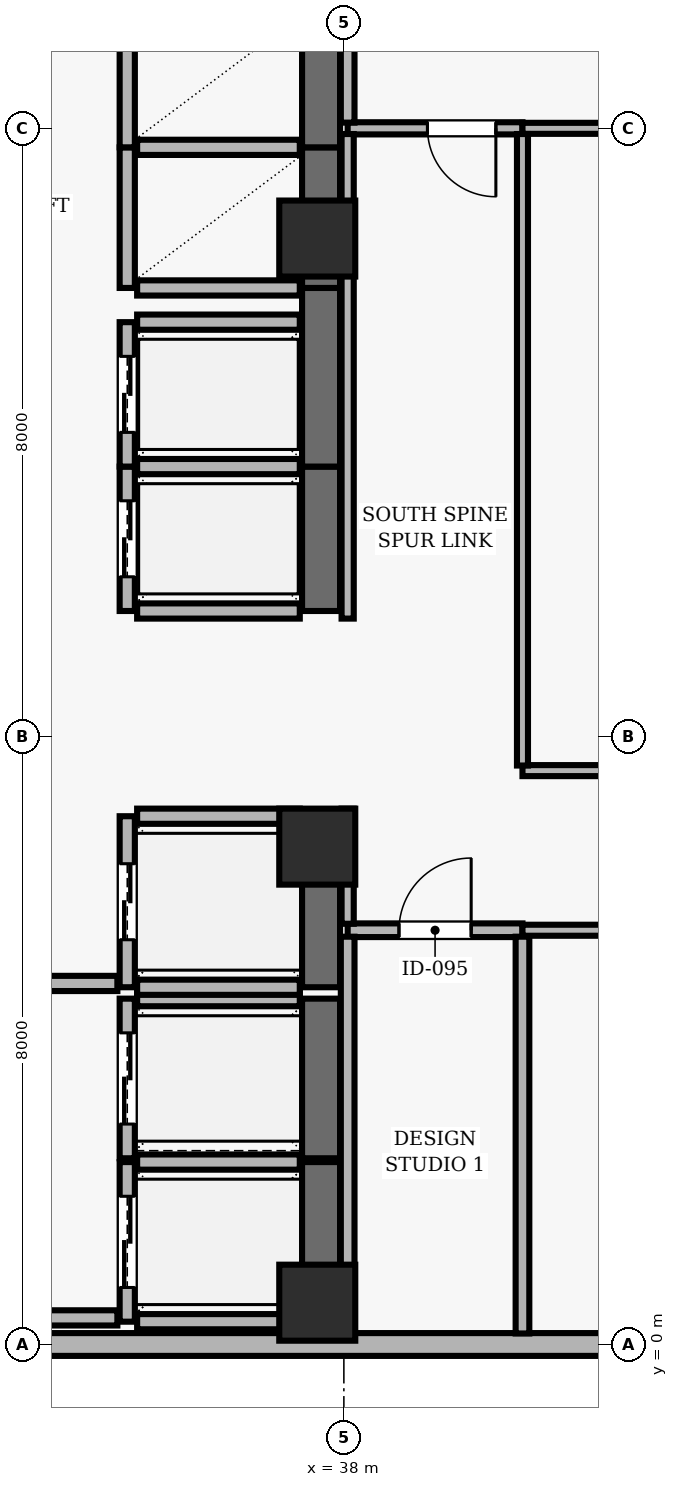
"""IFC4 building model, lengths in metres.
Left out: names, types, materials, properties, quantities, classifications, styles, units other than length and angle.
Written with IfcOpenShell. Run it as: python <this file> out.ifc"""

import sys

from ifc_helpers import new_model, si_unit, direction, frame, frame_2d, origin, origin_2d, place, context, subcontext, project, spatial, rectangle, extrude, element, fill, save


model = new_model("IFC4")
c1 = context("Model", 3, precision=1e-05, world=origin(), true_north=direction((0.0, 1.0)))
c2 = subcontext(c1, "Body", "Model", "MODEL_VIEW")
j1 = project(units=[si_unit("LENGTHUNIT", "METRE"), si_unit("PLANEANGLEUNIT", "RADIAN")], contexts=[c1])
p1 = place(None, origin())
s1 = spatial("IfcSite", under=j1, at=p1, CompositionType="ELEMENT")
p2 = place(p1, origin())
s2 = spatial("IfcBuilding", under=s1, at=p2, CompositionType="ELEMENT")
p3 = place(p2, frame((0.0, 0.0, 191.4)))
s3 = spatial("IfcBuildingStorey", under=s2, at=p3, CompositionType="ELEMENT", Elevation=191.4)
for number, where, z_axis, x_axis in (
    (1, (37.65, 0.55, 0.0), (0.0, 0.0, 1.0), (1.0, 0.0, 0.0)),
    (2, (37.65, 6.55, 0.0), (0.0, 0.0, 1.0), (1.0, 0.0, 0.0)),
    (3, (37.65, 14.55, 0.0), (0.0, 0.0, 1.0), (1.0, 0.0, 0.0)),
):
    element("IfcColumn", number, at=place(p3, frame(where, z_axis=z_axis, x_axis=x_axis)), inside=s3, PredefinedType="COLUMN", context=c2, shape_type="SweptSolid", body=[
        extrude(rectangle(XDim=1.0, YDim=1.0, at=origin_2d()), origin(), (0.0, 0.0, 1.0), 3.9),
    ])
p4 = place(p3, frame((24.5, 0.0, 0.0), z_axis=(0.0, 0.0, 1.0), x_axis=(1.0, 0.0, 0.0)))
e4 = element("IfcWall", 4, at=p4, inside=s3, PredefinedType="SOLIDWALL", context=c2, shape_type="SweptSolid", body=[
    extrude(rectangle(XDim=38.2, YDim=0.3, at=frame_2d((19.1, 0.0))), origin(), (0.0, 0.0, 1.0), 3.69),
])
p5 = place(p4, frame((1.529, 0.0, 0.9)))
e5 = element("IfcOpeningElement", 5, at=p5, cuts=e4, PredefinedType="OPENING", context=c2, shape_type="SweptSolid", body=[
    extrude(rectangle(XDim=2.4, YDim=2.2, at=frame_2d((1.2, 1.1))), frame((0.0, 0.16, 0.0), z_axis=(0.0, -1.0, 0.0), x_axis=(1.0, 0.0, 0.0)), (0.0, 0.0, 1.0), 0.32),
])
p6 = place(p4, frame((17.9, 0.0, 0.9)))
e6 = element("IfcOpeningElement", 6, at=p6, cuts=e4, PredefinedType="OPENING", context=c2, shape_type="SweptSolid", body=[
    extrude(rectangle(XDim=2.4, YDim=2.2, at=frame_2d((1.2, 1.1))), frame((0.0, 0.16, 0.0), z_axis=(0.0, -1.0, 0.0), x_axis=(1.0, 0.0, 0.0)), (0.0, 0.0, 1.0), 0.32),
])
p7 = place(p4, frame((23.357, 0.0, 0.9)))
e7 = element("IfcOpeningElement", 7, at=p7, cuts=e4, PredefinedType="OPENING", context=c2, shape_type="SweptSolid", body=[
    extrude(rectangle(XDim=2.4, YDim=2.2, at=frame_2d((1.2, 1.1))), frame((0.0, 0.16, 0.0), z_axis=(0.0, -1.0, 0.0), x_axis=(1.0, 0.0, 0.0)), (0.0, 0.0, 1.0), 0.32),
])
p8 = place(p4, frame((28.814, 0.0, 0.9)))
e8 = element("IfcOpeningElement", 8, at=p8, cuts=e4, PredefinedType="OPENING", context=c2, shape_type="SweptSolid", body=[
    extrude(rectangle(XDim=2.4, YDim=2.2, at=frame_2d((1.2, 1.1))), frame((0.0, 0.16, 0.0), z_axis=(0.0, -1.0, 0.0), x_axis=(1.0, 0.0, 0.0)), (0.0, 0.0, 1.0), 0.32),
])
p9 = place(p4, frame((34.271, 0.0, 0.9)))
e9 = element("IfcOpeningElement", 9, at=p9, cuts=e4, PredefinedType="OPENING", context=c2, shape_type="SweptSolid", body=[
    extrude(rectangle(XDim=2.4, YDim=2.2, at=frame_2d((1.2, 1.1))), frame((0.0, 0.16, 0.0), z_axis=(0.0, -1.0, 0.0), x_axis=(1.0, 0.0, 0.0)), (0.0, 0.0, 1.0), 0.32),
])
p10 = place(p3, frame((35.15, 2.4, 0.0), z_axis=(0.0, 0.0, 1.0), x_axis=(0.0, -1.0, 0.0)))
e10 = element("IfcWall", 10, at=p10, inside=s3, PredefinedType="SOLIDWALL", context=c2, shape_type="SweptSolid", body=[
    extrude(rectangle(XDim=2.1, YDim=0.2, at=frame_2d((1.05, 0.0))), origin(), (0.0, 0.0, 1.0), 3.69),
])
p11 = place(p10, frame((0.45, 0.0, 0.0)))
e11 = element("IfcOpeningElement", 11, at=p11, cuts=e10, PredefinedType="OPENING", context=c2, shape_type="SweptSolid", body=[
    extrude(rectangle(XDim=1.2, YDim=2.15, at=frame_2d((0.6, 1.075))), frame((0.0, 0.11, 0.0), z_axis=(0.0, -1.0, 0.0), x_axis=(1.0, 0.0, 0.0)), (0.0, 0.0, 1.0), 0.22),
])
p12 = place(p3, frame((37.7, 0.3, 0.0), z_axis=(0.0, 0.0, 1.0), x_axis=(0.0, 1.0, 0.0)))
e12 = element("IfcWall", 12, at=p12, inside=s3, PredefinedType="SHEAR", context=c2, shape_type="SweptSolid", body=[
    extrude(rectangle(XDim=2.1, YDim=0.5, at=frame_2d((1.05, 0.0))), origin(), (0.0, 0.0, 1.0), 3.69),
])
for number, where, z_axis, x_axis in (
    (13, (35.28, 0.3, 0.0), (0.0, 0.0, 1.0), (1.0, 0.0, 0.0)),
    (14, (37.42, 2.4, 0.0), (0.0, 0.0, 1.0), (-1.0, 0.0, 0.0)),
):
    element("IfcWall", number, at=place(p3, frame(where, z_axis=z_axis, x_axis=x_axis)), inside=s3, PredefinedType="SOLIDWALL", context=c2, shape_type="SweptSolid", body=[
        extrude(rectangle(XDim=2.14, YDim=0.2, at=frame_2d((1.07, 0.0))), origin(), (0.0, 0.0, 1.0), 3.69),
    ])
p13 = place(p3, frame((35.15, 4.55, 0.0), z_axis=(0.0, 0.0, 1.0), x_axis=(0.0, -1.0, 0.0)))
e15 = element("IfcWall", 15, at=p13, inside=s3, PredefinedType="SOLIDWALL", context=c2, shape_type="SweptSolid", body=[
    extrude(rectangle(XDim=2.1, YDim=0.2, at=frame_2d((1.05, 0.0))), origin(), (0.0, 0.0, 1.0), 3.69),
])
p14 = place(p13, frame((0.45, 0.0, 0.0)))
e16 = element("IfcOpeningElement", 16, at=p14, cuts=e15, PredefinedType="OPENING", context=c2, shape_type="SweptSolid", body=[
    extrude(rectangle(XDim=1.2, YDim=2.15, at=frame_2d((0.6, 1.075))), frame((0.0, 0.11, 0.0), z_axis=(0.0, -1.0, 0.0), x_axis=(1.0, 0.0, 0.0)), (0.0, 0.0, 1.0), 0.22),
])
p15 = place(p3, frame((37.7, 2.45, 0.0), z_axis=(0.0, 0.0, 1.0), x_axis=(0.0, 1.0, 0.0)))
e17 = element("IfcWall", 17, at=p15, inside=s3, PredefinedType="SHEAR", context=c2, shape_type="SweptSolid", body=[
    extrude(rectangle(XDim=2.1, YDim=0.5, at=frame_2d((1.05, 0.0))), origin(), (0.0, 0.0, 1.0), 3.69),
])
p16 = place(p3, frame((37.42, 4.55, 0.0), z_axis=(0.0, 0.0, 1.0), x_axis=(-1.0, 0.0, 0.0)))
e18 = element("IfcWall", 18, at=p16, inside=s3, PredefinedType="SOLIDWALL", context=c2, shape_type="SweptSolid", body=[
    extrude(rectangle(XDim=2.14, YDim=0.2, at=frame_2d((1.07, 0.0))), origin(), (0.0, 0.0, 1.0), 3.69),
])
p17 = place(p3, frame((35.15, 6.95, 0.0), z_axis=(0.0, 0.0, 1.0), x_axis=(0.0, -1.0, 0.0)))
e19 = element("IfcWall", 19, at=p17, inside=s3, PredefinedType="SOLIDWALL", context=c2, shape_type="SweptSolid", body=[
    extrude(rectangle(XDim=2.25, YDim=0.2, at=frame_2d((1.125, 0.0))), origin(), (0.0, 0.0, 1.0), 3.69),
])
p18 = place(p17, frame((0.625, 0.0, 0.0)))
e20 = element("IfcOpeningElement", 20, at=p18, cuts=e19, PredefinedType="OPENING", context=c2, shape_type="SweptSolid", body=[
    extrude(rectangle(XDim=1.0, YDim=2.1, at=frame_2d((0.5, 1.05))), frame((0.0, 0.11, 0.0), z_axis=(0.0, -1.0, 0.0), x_axis=(1.0, 0.0, 0.0)), (0.0, 0.0, 1.0), 0.22),
])
p19 = place(p3, frame((37.7, 4.7, 0.0), z_axis=(0.0, 0.0, 1.0), x_axis=(0.0, 1.0, 0.0)))
e21 = element("IfcWall", 21, at=p19, inside=s3, PredefinedType="SHEAR", context=c2, shape_type="SweptSolid", body=[
    extrude(rectangle(XDim=2.25, YDim=0.5, at=frame_2d((1.125, 0.0))), origin(), (0.0, 0.0, 1.0), 3.69),
])
for number, where, z_axis, x_axis in (
    (22, (35.28, 4.7, 0.0), (0.0, 0.0, 1.0), (1.0, 0.0, 0.0)),
    (23, (37.42, 6.95, 0.0), (0.0, 0.0, 1.0), (-1.0, 0.0, 0.0)),
):
    element("IfcWall", number, at=place(p3, frame(where, z_axis=z_axis, x_axis=x_axis)), inside=s3, PredefinedType="SOLIDWALL", context=c2, shape_type="SweptSolid", body=[
        extrude(rectangle(XDim=2.14, YDim=0.2, at=frame_2d((1.07, 0.0))), origin(), (0.0, 0.0, 1.0), 3.69),
    ])
p20 = place(p3, frame((35.15, 11.55, 0.0), z_axis=(0.0, 0.0, 1.0), x_axis=(0.0, -1.0, 0.0)))
e24 = element("IfcWall", 24, at=p20, inside=s3, PredefinedType="SOLIDWALL", context=c2, shape_type="SweptSolid", body=[
    extrude(rectangle(XDim=1.9, YDim=0.2, at=frame_2d((0.95, 0.0))), origin(), (0.0, 0.0, 1.0), 3.69),
])
p21 = place(p20, frame((0.45, 0.0, 0.0)))
e25 = element("IfcOpeningElement", 25, at=p21, cuts=e24, PredefinedType="OPENING", context=c2, shape_type="SweptSolid", body=[
    extrude(rectangle(XDim=1.0, YDim=2.1, at=frame_2d((0.5, 1.05))), frame((0.0, 0.11, 0.0), z_axis=(0.0, -1.0, 0.0), x_axis=(1.0, 0.0, 0.0)), (0.0, 0.0, 1.0), 0.22),
])
p22 = place(p3, frame((37.7, 9.65, 0.0), z_axis=(0.0, 0.0, 1.0), x_axis=(0.0, 1.0, 0.0)))
e26 = element("IfcWall", 26, at=p22, inside=s3, PredefinedType="SHEAR", context=c2, shape_type="SweptSolid", body=[
    extrude(rectangle(XDim=1.9, YDim=0.5, at=frame_2d((0.95, 0.0))), origin(), (0.0, 0.0, 1.0), 3.69),
])
for number, where, z_axis, x_axis in (
    (27, (35.28, 9.65, 0.0), (0.0, 0.0, 1.0), (1.0, 0.0, 0.0)),
    (28, (37.42, 11.55, 0.0), (0.0, 0.0, 1.0), (-1.0, 0.0, 0.0)),
):
    element("IfcWall", number, at=place(p3, frame(where, z_axis=z_axis, x_axis=x_axis)), inside=s3, PredefinedType="SOLIDWALL", context=c2, shape_type="SweptSolid", body=[
        extrude(rectangle(XDim=2.14, YDim=0.2, at=frame_2d((1.07, 0.0))), origin(), (0.0, 0.0, 1.0), 3.69),
    ])
p23 = place(p3, frame((35.15, 13.45, 0.0), z_axis=(0.0, 0.0, 1.0), x_axis=(0.0, -1.0, 0.0)))
e29 = element("IfcWall", 29, at=p23, inside=s3, PredefinedType="SOLIDWALL", context=c2, shape_type="SweptSolid", body=[
    extrude(rectangle(XDim=1.9, YDim=0.2, at=frame_2d((0.95, 0.0))), origin(), (0.0, 0.0, 1.0), 3.69),
])
p24 = place(p23, frame((0.45, 0.0, 0.0)))
e30 = element("IfcOpeningElement", 30, at=p24, cuts=e29, PredefinedType="OPENING", context=c2, shape_type="SweptSolid", body=[
    extrude(rectangle(XDim=1.0, YDim=2.1, at=frame_2d((0.5, 1.05))), frame((0.0, 0.11, 0.0), z_axis=(0.0, -1.0, 0.0), x_axis=(1.0, 0.0, 0.0)), (0.0, 0.0, 1.0), 0.22),
])
p25 = place(p3, frame((37.7, 11.55, 0.0), z_axis=(0.0, 0.0, 1.0), x_axis=(0.0, 1.0, 0.0)))
e31 = element("IfcWall", 31, at=p25, inside=s3, PredefinedType="SHEAR", context=c2, shape_type="SweptSolid", body=[
    extrude(rectangle(XDim=2.35, YDim=0.5, at=frame_2d((1.175, 0.0))), origin(), (0.0, 0.0, 1.0), 3.69),
])
p26 = place(p3, frame((37.42, 13.45, 0.0), z_axis=(0.0, 0.0, 1.0), x_axis=(-1.0, 0.0, 0.0)))
e32 = element("IfcWall", 32, at=p26, inside=s3, PredefinedType="SOLIDWALL", context=c2, shape_type="SweptSolid", body=[
    extrude(rectangle(XDim=2.14, YDim=0.2, at=frame_2d((1.07, 0.0))), origin(), (0.0, 0.0, 1.0), 3.69),
])
p27 = place(p3, frame((35.15, 15.75, 0.0), z_axis=(0.0, 0.0, 1.0), x_axis=(0.0, -1.0, 0.0)))
e33 = element("IfcWall", 33, at=p27, inside=s3, PredefinedType="SOLIDWALL", context=c2, shape_type="SweptSolid", body=[
    extrude(rectangle(XDim=1.85, YDim=0.2, at=frame_2d((0.925, 0.0))), origin(), (0.0, 0.0, 1.0), 3.69),
])
p28 = place(p3, frame((37.7, 13.9, 0.0), z_axis=(0.0, 0.0, 1.0), x_axis=(0.0, 1.0, 0.0)))
e34 = element("IfcWall", 34, at=p28, inside=s3, PredefinedType="SHEAR", context=c2, shape_type="SweptSolid", body=[
    extrude(rectangle(XDim=1.85, YDim=0.5, at=frame_2d((0.925, 0.0))), origin(), (0.0, 0.0, 1.0), 3.69),
])
for number, where, z_axis, x_axis in (
    (35, (35.28, 13.9, 0.0), (0.0, 0.0, 1.0), (1.0, 0.0, 0.0)),
    (36, (37.42, 15.75, 0.0), (0.0, 0.0, 1.0), (-1.0, 0.0, 0.0)),
):
    element("IfcWall", number, at=place(p3, frame(where, z_axis=z_axis, x_axis=x_axis)), inside=s3, PredefinedType="SOLIDWALL", context=c2, shape_type="SweptSolid", body=[
        extrude(rectangle(XDim=2.14, YDim=0.2, at=frame_2d((1.07, 0.0))), origin(), (0.0, 0.0, 1.0), 3.69),
    ])
p29 = place(p3, frame((35.15, 17.6, 0.0), z_axis=(0.0, 0.0, 1.0), x_axis=(0.0, -1.0, 0.0)))
e37 = element("IfcWall", 37, at=p29, inside=s3, PredefinedType="SOLIDWALL", context=c2, shape_type="SweptSolid", body=[
    extrude(rectangle(XDim=1.85, YDim=0.2, at=frame_2d((0.925, 0.0))), origin(), (0.0, 0.0, 1.0), 3.69),
])
p30 = place(p3, frame((37.7, 15.75, 0.0), z_axis=(0.0, 0.0, 1.0), x_axis=(0.0, 1.0, 0.0)))
e38 = element("IfcWall", 38, at=p30, inside=s3, PredefinedType="SHEAR", context=c2, shape_type="SweptSolid", body=[
    extrude(rectangle(XDim=1.85, YDim=0.5, at=frame_2d((0.925, 0.0))), origin(), (0.0, 0.0, 1.0), 3.69),
])
p31 = place(p3, frame((31.65, 0.35, 0.0), z_axis=(0.0, 0.0, 1.0), x_axis=(1.0, 0.0, 0.0)))
e39 = element("IfcWall", 39, at=p31, inside=s3, PredefinedType="SOLIDWALL", context=c2, shape_type="SweptSolid", body=[
    extrude(rectangle(XDim=3.37, YDim=0.2, at=frame_2d((1.685, 0.0))), origin(), (0.0, 0.0, 1.0), 3.69),
])
p32 = place(p3, frame((35.02, 4.75, 0.0), z_axis=(0.0, 0.0, 1.0), x_axis=(-1.0, 0.0, 0.0)))
e40 = element("IfcWall", 40, at=p32, inside=s3, PredefinedType="SOLIDWALL", context=c2, shape_type="SweptSolid", body=[
    extrude(rectangle(XDim=3.11, YDim=0.2, at=frame_2d((1.555, 0.0))), origin(), (0.0, 0.0, 1.0), 3.69),
])
p33 = place(p32, frame((1.03, 0.0, 0.0)))
e41 = element("IfcOpeningElement", 41, at=p33, cuts=e40, PredefinedType="OPENING", context=c2, shape_type="SweptSolid", body=[
    extrude(rectangle(XDim=1.05, YDim=2.15, at=frame_2d((0.525, 1.075))), frame((0.0, 0.11, 0.0), z_axis=(0.0, -1.0, 0.0), x_axis=(1.0, 0.0, 0.0)), (0.0, 0.0, 1.0), 0.22),
])
p34 = place(p3, frame((38.05, 5.45, 0.0), z_axis=(0.0, 0.0, 1.0), x_axis=(1.0, 0.0, 0.0)))
e42 = element("IfcWall", 42, at=p34, inside=s3, PredefinedType="PARTITIONING", context=c2, shape_type="SweptSolid", body=[
    extrude(rectangle(XDim=2.3, YDim=0.18, at=frame_2d((1.15, 0.0))), origin(), (0.0, 0.0, 1.0), 3.343),
])
p35 = place(p34, frame((0.675, 0.0, 0.0)))
e43 = element("IfcOpeningElement", 43, at=p35, cuts=e42, PredefinedType="OPENING", context=c2, shape_type="SweptSolid", body=[
    extrude(rectangle(XDim=0.95, YDim=2.1, at=frame_2d((0.475, 1.05))), frame((0.0, 0.1, 0.0), z_axis=(0.0, -1.0, 0.0), x_axis=(1.0, 0.0, 0.0)), (0.0, 0.0, 1.0), 0.2),
])
p36 = place(p3, frame((40.35, 5.45, 0.0), z_axis=(0.0, 0.0, 1.0), x_axis=(1.0, 0.0, 0.0)))
e44 = element("IfcWall", 44, at=p36, inside=s3, PredefinedType="PARTITIONING", context=c2, shape_type="SweptSolid", body=[
    extrude(rectangle(XDim=11.65, YDim=0.145, at=frame_2d((5.825, 0.0))), origin(), (0.0, 0.0, 1.0), 3.343),
])
p37 = place(p36, frame((5.275, 0.0, 0.0)))
e45 = element("IfcOpeningElement", 45, at=p37, cuts=e44, PredefinedType="OPENING", context=c2, shape_type="SweptSolid", body=[
    extrude(rectangle(XDim=1.1, YDim=2.15, at=frame_2d((0.55, 1.075))), frame((0.0, 0.083, 0.0), z_axis=(0.0, -1.0, 0.0), x_axis=(1.0, 0.0, 0.0)), (0.0, 0.0, 1.0), 0.165),
])
p38 = place(p3, frame((40.35, 16.0, 0.0), z_axis=(0.0, 0.0, 1.0), x_axis=(-1.0, 0.0, 0.0)))
e46 = element("IfcWall", 46, at=p38, inside=s3, PredefinedType="PARTITIONING", context=c2, shape_type="SweptSolid", body=[
    extrude(rectangle(XDim=2.3, YDim=0.16, at=frame_2d((1.15, 0.0))), origin(), (0.0, 0.0, 1.0), 3.69),
])
p39 = place(p38, frame((0.35, 0.0, 0.0)))
e47 = element("IfcOpeningElement", 47, at=p39, cuts=e46, PredefinedType="OPENING", context=c2, shape_type="SweptSolid", body=[
    extrude(rectangle(XDim=0.9, YDim=2.1, at=frame_2d((0.45, 1.05))), frame((0.0, 0.09, 0.0), z_axis=(0.0, -1.0, 0.0), x_axis=(1.0, 0.0, 0.0)), (0.0, 0.0, 1.0), 0.18),
])
p40 = place(p3, frame((40.35, 16.0, 0.0), z_axis=(0.0, 0.0, 1.0), x_axis=(1.0, 0.0, 0.0)))
e48 = element("IfcWall", 48, at=p40, inside=s3, PredefinedType="PARTITIONING", context=c2, shape_type="SweptSolid", body=[
    extrude(rectangle(XDim=8.055, YDim=0.145, at=frame_2d((4.027, 0.0))), origin(), (0.0, 0.0, 1.0), 3.39),
])
p41 = place(p3, frame((52.0, 7.55, 0.0), z_axis=(0.0, 0.0, 1.0), x_axis=(-1.0, 0.0, 0.0)))
e49 = element("IfcWall", 49, at=p41, inside=s3, PredefinedType="PARTITIONING", context=c2, shape_type="SweptSolid", body=[
    extrude(rectangle(XDim=11.65, YDim=0.145, at=frame_2d((5.825, 0.0))), origin(), (0.0, 0.0, 1.0), 3.139),
])
p42 = place(p41, frame((3.175, 0.0, 0.0)))
e50 = element("IfcOpeningElement", 50, at=p42, cuts=e49, PredefinedType="OPENING", context=c2, shape_type="SweptSolid", body=[
    extrude(rectangle(XDim=1.1, YDim=2.15, at=frame_2d((0.55, 1.075))), frame((0.0, 0.083, 0.0), z_axis=(0.0, -1.0, 0.0), x_axis=(1.0, 0.0, 0.0)), (0.0, 0.0, 1.0), 0.165),
])
p43 = place(p3, frame((38.05, 5.365, 0.0), z_axis=(0.0, 0.0, 1.0), x_axis=(0.0, -1.0, 0.0)))
e51 = element("IfcWall", 51, at=p43, inside=s3, PredefinedType="PARTITIONING", context=c2, shape_type="SweptSolid", body=[
    extrude(rectangle(XDim=5.22, YDim=0.18, at=frame_2d((2.61, 0.0))), origin(), (0.0, 0.0, 1.0), 3.139),
])
p44 = place(p3, frame((38.05, 7.05, 0.0), z_axis=(0.0, 0.0, 1.0), x_axis=(0.0, -1.0, 0.0)))
e52 = element("IfcWall", 52, at=p44, inside=s3, PredefinedType="PARTITIONING", context=c2, shape_type="SweptSolid", body=[
    extrude(rectangle(XDim=1.515, YDim=0.16, at=frame_2d((0.758, 0.0))), origin(), (0.0, 0.0, 1.0), 3.139),
])
p45 = place(p3, frame((38.05, 15.925, 0.0), z_axis=(0.0, 0.0, 1.0), x_axis=(0.0, -1.0, 0.0)))
e53 = element("IfcWall", 53, at=p45, inside=s3, PredefinedType="PARTITIONING", context=c2, shape_type="SweptSolid", body=[
    extrude(rectangle(XDim=6.375, YDim=0.16, at=frame_2d((3.188, 0.0))), origin(), (0.0, 0.0, 1.0), 3.139),
])
p46 = place(p3, frame((38.05, 23.843, 0.0), z_axis=(0.0, 0.0, 1.0), x_axis=(0.0, -1.0, 0.0)))
e54 = element("IfcWall", 54, at=p46, inside=s3, PredefinedType="PARTITIONING", context=c2, shape_type="SweptSolid", body=[
    extrude(rectangle(XDim=7.768, YDim=0.18, at=frame_2d((3.884, 0.0))), origin(), (0.0, 0.0, 1.0), 3.139),
])
p47 = place(p3, frame((40.35, 0.145, 0.0), z_axis=(0.0, 0.0, 1.0), x_axis=(0.0, 1.0, 0.0)))
e55 = element("IfcWall", 55, at=p47, inside=s3, PredefinedType="PARTITIONING", context=c2, shape_type="SweptSolid", body=[
    extrude(rectangle(XDim=5.22, YDim=0.18, at=frame_2d((2.61, 0.0))), origin(), (0.0, 0.0, 1.0), 3.69),
])
p48 = place(p3, frame((40.35, 7.617, 0.0), z_axis=(0.0, 0.0, 1.0), x_axis=(0.0, 1.0, 0.0)))
e56 = element("IfcWall", 56, at=p48, inside=s3, PredefinedType="PARTITIONING", context=c2, shape_type="SweptSolid", body=[
    extrude(rectangle(XDim=8.308, YDim=0.145, at=frame_2d((4.154, 0.0))), origin(), (0.0, 0.0, 1.0), 3.343),
])
p49 = place(p11, origin())
e57 = element("IfcDoor", 57, at=p49, inside=s3, OperationType="DOUBLE_DOOR_SLIDING", PredefinedType="DOOR", context=c2, shape_type="SweptSolid", body=[
    extrude(rectangle(XDim=1.2, YDim=2.15, at=frame_2d((0.6, 1.075))), frame((0.0, 0.025, 0.0), z_axis=(0.0, -1.0, 0.0), x_axis=(1.0, 0.0, 0.0)), (0.0, 0.0, 1.0), 0.05),
])
fill(e11, e57)
p50 = place(p14, origin())
e58 = element("IfcDoor", 58, at=p50, inside=s3, OperationType="DOUBLE_DOOR_SLIDING", PredefinedType="DOOR", context=c2, shape_type="SweptSolid", body=[
    extrude(rectangle(XDim=1.2, YDim=2.15, at=frame_2d((0.6, 1.075))), frame((0.0, 0.025, 0.0), z_axis=(0.0, -1.0, 0.0), x_axis=(1.0, 0.0, 0.0)), (0.0, 0.0, 1.0), 0.05),
])
fill(e16, e58)
p51 = place(p18, origin())
e59 = element("IfcDoor", 59, at=p51, inside=s3, OperationType="DOUBLE_DOOR_SLIDING", PredefinedType="DOOR", context=c2, shape_type="SweptSolid", body=[
    extrude(rectangle(XDim=1.0, YDim=2.1, at=frame_2d((0.5, 1.05))), frame((0.0, 0.025, 0.0), z_axis=(0.0, -1.0, 0.0), x_axis=(1.0, 0.0, 0.0)), (0.0, 0.0, 1.0), 0.05),
])
fill(e20, e59)
p52 = place(p21, origin())
e60 = element("IfcDoor", 60, at=p52, inside=s3, OperationType="DOUBLE_DOOR_SLIDING", PredefinedType="DOOR", context=c2, shape_type="SweptSolid", body=[
    extrude(rectangle(XDim=1.0, YDim=2.1, at=frame_2d((0.5, 1.05))), frame((0.0, 0.025, 0.0), z_axis=(0.0, -1.0, 0.0), x_axis=(1.0, 0.0, 0.0)), (0.0, 0.0, 1.0), 0.05),
])
fill(e25, e60)
p53 = place(p24, origin())
e61 = element("IfcDoor", 61, at=p53, inside=s3, OperationType="DOUBLE_DOOR_SLIDING", PredefinedType="DOOR", context=c2, shape_type="SweptSolid", body=[
    extrude(rectangle(XDim=1.0, YDim=2.1, at=frame_2d((0.5, 1.05))), frame((0.0, 0.025, 0.0), z_axis=(0.0, -1.0, 0.0), x_axis=(1.0, 0.0, 0.0)), (0.0, 0.0, 1.0), 0.05),
])
fill(e30, e61)
p54 = place(p35, origin())
e62 = element("IfcDoor", 62, at=p54, inside=s3, OperationType="SINGLE_SWING_RIGHT", PredefinedType="DOOR", context=c2, shape_type="SweptSolid", body=[
    extrude(rectangle(XDim=0.95, YDim=2.1, at=frame_2d((0.475, 1.05))), frame((0.0, 0.025, 0.0), z_axis=(0.0, -1.0, 0.0), x_axis=(1.0, 0.0, 0.0)), (0.0, 0.0, 1.0), 0.05),
])
fill(e43, e62)
p55 = place(p39, origin())
e63 = element("IfcDoor", 63, at=p55, inside=s3, OperationType="SINGLE_SWING_LEFT", PredefinedType="DOOR", context=c2, shape_type="SweptSolid", body=[
    extrude(rectangle(XDim=0.9, YDim=2.1, at=frame_2d((0.45, 1.05))), frame((0.0, 0.025, 0.0), z_axis=(0.0, -1.0, 0.0), x_axis=(1.0, 0.0, 0.0)), (0.0, 0.0, 1.0), 0.05),
])
fill(e47, e63)
save(model, sys.argv[1])
